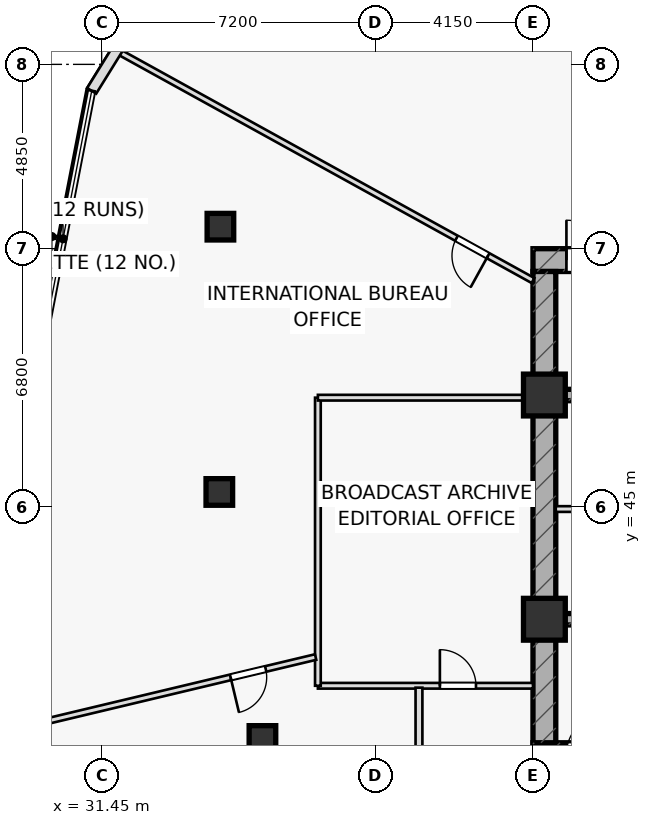
"""IFC4 building model, lengths in metres.
Left out: names, types, materials, properties, quantities, classifications, styles, units other than length and angle.
Written with IfcOpenShell. Run it as: python <this file> out.ifc"""

import sys

from ifc_helpers import new_model, si_unit, direction, frame, frame_2d, origin, origin_2d, place, context, subcontext, project, spatial, rectangle, hollow_rectangle, extrude, element, fill, save


model = new_model("IFC4")
c1 = context("Model", 3, precision=1e-05, world=origin(), true_north=direction((0.0, 1.0)))
c2 = subcontext(c1, "Body", "Model", "MODEL_VIEW")
j1 = project(units=[si_unit("LENGTHUNIT", "METRE"), si_unit("PLANEANGLEUNIT", "RADIAN")], contexts=[c1])
p1 = place(None, origin())
s1 = spatial("IfcSite", under=j1, at=p1, CompositionType="ELEMENT")
p2 = place(p1, origin())
s2 = spatial("IfcBuilding", under=s1, at=p2, CompositionType="ELEMENT")
p3 = place(p2, frame((0.0, 0.0, 127.15)))
s3 = spatial("IfcBuildingStorey", under=s2, at=p3, CompositionType="ELEMENT", Elevation=127.15)
p4 = place(p3, frame((42.8, 51.5, 0.0), z_axis=(0.0, 0.0, 1.0), x_axis=(1.0, 0.0, 0.0)))
e1 = element("IfcWall", 1, at=p4, inside=s3, PredefinedType="SHEAR", context=c2, shape_type="SweptSolid", body=[
    extrude(rectangle(XDim=14.4, YDim=0.6, at=frame_2d((7.2, 0.0))), origin(), (0.0, 0.0, 1.0), 3.55),
])
p5 = place(p4, frame((0.88, 0.0, 0.0)))
e2 = element("IfcOpeningElement", 2, at=p5, cuts=e1, PredefinedType="OPENING", context=c2, shape_type="SweptSolid", body=[
    extrude(rectangle(XDim=1.05, YDim=2.2, at=frame_2d((0.525, 1.1))), frame((0.0, 0.31, 0.0), z_axis=(0.0, -1.0, 0.0), x_axis=(1.0, 0.0, 0.0)), (0.0, 0.0, 1.0), 0.62),
])
p6 = place(p3, frame((42.8, 38.5, 0.0), z_axis=(0.0, 0.0, 1.0), x_axis=(1.0, 0.0, 0.0)))
e3 = element("IfcWall", 3, at=p6, inside=s3, PredefinedType="SHEAR", context=c2, shape_type="SweptSolid", body=[
    extrude(rectangle(XDim=14.4, YDim=0.6, at=frame_2d((7.2, 0.0))), origin(), (0.0, 0.0, 1.0), 3.55),
])
p7 = place(p6, frame((0.88, 0.0, 0.0)))
e4 = element("IfcOpeningElement", 4, at=p7, cuts=e3, PredefinedType="OPENING", context=c2, shape_type="SweptSolid", body=[
    extrude(rectangle(XDim=1.05, YDim=2.2, at=frame_2d((0.525, 1.1))), frame((0.0, 0.31, 0.0), z_axis=(0.0, -1.0, 0.0), x_axis=(1.0, 0.0, 0.0)), (0.0, 0.0, 1.0), 0.62),
])
p8 = place(p3, frame((43.1, 38.8, 0.0), z_axis=(0.0, 0.0, 1.0), x_axis=(0.0, 1.0, 0.0)))
e5 = element("IfcWall", 5, at=p8, inside=s3, PredefinedType="SHEAR", context=c2, shape_type="SweptSolid", body=[
    extrude(rectangle(XDim=12.4, YDim=0.6, at=frame_2d((6.2, 0.0))), origin(), (0.0, 0.0, 1.0), 3.55),
])
p9 = place(p3, frame((43.4, 47.95, 0.0), z_axis=(0.0, 0.0, 1.0), x_axis=(1.0, 0.0, 0.0)))
e6 = element("IfcWall", 6, at=p9, inside=s3, PredefinedType="SHEAR", context=c2, shape_type="SweptSolid", body=[
    extrude(rectangle(XDim=13.2, YDim=0.3, at=frame_2d((6.6, 0.0))), origin(), (0.0, 0.0, 1.0), 3.55),
])
p10 = place(p9, frame((8.345, 0.0, 0.0)))
e7 = element("IfcOpeningElement", 7, at=p10, cuts=e6, PredefinedType="OPENING", context=c2, shape_type="SweptSolid", body=[
    extrude(rectangle(XDim=1.15, YDim=2.2, at=frame_2d((0.575, 1.1))), frame((0.0, 0.16, 0.0), z_axis=(0.0, -1.0, 0.0), x_axis=(1.0, 0.0, 0.0)), (0.0, 0.0, 1.0), 0.32),
])
p11 = place(p9, frame((10.065, 0.0, 0.0)))
e8 = element("IfcOpeningElement", 8, at=p11, cuts=e6, PredefinedType="OPENING", context=c2, shape_type="SweptSolid", body=[
    extrude(rectangle(XDim=1.15, YDim=2.2, at=frame_2d((0.575, 1.1))), frame((0.0, 0.16, 0.0), z_axis=(0.0, -1.0, 0.0), x_axis=(1.0, 0.0, 0.0)), (0.0, 0.0, 1.0), 0.32),
])
p12 = place(p9, frame((11.645, 0.0, 0.0)))
e9 = element("IfcOpeningElement", 9, at=p12, cuts=e6, PredefinedType="OPENING", context=c2, shape_type="SweptSolid", body=[
    extrude(rectangle(XDim=1.15, YDim=2.2, at=frame_2d((0.575, 1.1))), frame((0.0, 0.16, 0.0), z_axis=(0.0, -1.0, 0.0), x_axis=(1.0, 0.0, 0.0)), (0.0, 0.0, 1.0), 0.32),
])
p13 = place(p3, frame((43.4, 42.05, 0.0), z_axis=(0.0, 0.0, 1.0), x_axis=(1.0, 0.0, 0.0)))
e10 = element("IfcWall", 10, at=p13, inside=s3, PredefinedType="SHEAR", context=c2, shape_type="SweptSolid", body=[
    extrude(rectangle(XDim=13.2, YDim=0.3, at=frame_2d((6.6, 0.0))), origin(), (0.0, 0.0, 1.0), 3.55),
])
p14 = place(p13, frame((8.37, 0.0, 0.0)))
e11 = element("IfcOpeningElement", 11, at=p14, cuts=e10, PredefinedType="OPENING", context=c2, shape_type="SweptSolid", body=[
    extrude(rectangle(XDim=1.1, YDim=2.15, at=frame_2d((0.55, 1.075))), frame((0.0, 0.16, 0.0), z_axis=(0.0, -1.0, 0.0), x_axis=(1.0, 0.0, 0.0)), (0.0, 0.0, 1.0), 0.32),
])
p15 = place(p13, frame((10.09, 0.0, 0.0)))
e12 = element("IfcOpeningElement", 12, at=p15, cuts=e10, PredefinedType="OPENING", context=c2, shape_type="SweptSolid", body=[
    extrude(rectangle(XDim=1.1, YDim=2.15, at=frame_2d((0.55, 1.075))), frame((0.0, 0.16, 0.0), z_axis=(0.0, -1.0, 0.0), x_axis=(1.0, 0.0, 0.0)), (0.0, 0.0, 1.0), 0.32),
])
p16 = place(p13, frame((11.83, 0.0, 0.0)))
e13 = element("IfcOpeningElement", 13, at=p16, cuts=e10, PredefinedType="OPENING", context=c2, shape_type="SweptSolid", body=[
    extrude(rectangle(XDim=1.1, YDim=2.15, at=frame_2d((0.55, 1.075))), frame((0.0, 0.16, 0.0), z_axis=(0.0, -1.0, 0.0), x_axis=(1.0, 0.0, 0.0)), (0.0, 0.0, 1.0), 0.32),
])
for number, where, z_axis, x_axis in (
    (14, (43.1, 47.95, 0.0), (0.0, 0.0, 1.0), (1.0, 0.0, 0.0)),
    (15, (43.1, 42.05, 0.0), (0.0, 0.0, 1.0), (1.0, 0.0, 0.0)),
):
    element("IfcColumn", number, at=place(p3, frame(where, z_axis=z_axis, x_axis=x_axis)), inside=s3, PredefinedType="COLUMN", context=c2, shape_type="SweptSolid", body=[
        extrude(rectangle(XDim=1.1, YDim=1.1, at=origin_2d()), origin(), (0.0, 0.0, 1.0), 3.55),
    ])
for number, where, z_axis, x_axis in (
    (16, (34.575, 52.379, 0.0), (0.0, 0.0, 1.0), (1.0, 0.0, 0.0)),
    (17, (34.546, 45.399, 0.0), (0.0, 0.0, 1.0), (1.0, 0.0, 0.0)),
    (18, (35.681, 38.9, 0.0), (0.0, 0.0, 1.0), (1.0, 0.0, 0.0)),
):
    element("IfcColumn", number, at=place(p3, frame(where, z_axis=z_axis, x_axis=x_axis)), inside=s3, PredefinedType="COLUMN", context=c2, shape_type="SweptSolid", body=[
        extrude(hollow_rectangle(XDim=0.7, YDim=0.7, WallThickness=0.04, at=origin_2d()), origin(), (0.0, 0.0, 1.0), 3.55),
    ])
p17 = place(p3, frame((43.4, 44.95, 0.0), z_axis=(0.0, 0.0, 1.0), x_axis=(1.0, 0.0, 0.0)))
e19 = element("IfcWall", 19, at=p17, inside=s3, PredefinedType="PARTITIONING", context=c2, shape_type="SweptSolid", body=[
    extrude(rectangle(XDim=2.35, YDim=0.15, at=frame_2d((1.175, 0.0))), origin(), (0.0, 0.0, 1.0), 3.55),
])
p18 = place(p3, frame((37.14, 40.3, 0.0), z_axis=(0.0, 0.0, 1.0), x_axis=(1.0, 0.0, 0.0)))
e20 = element("IfcWall", 20, at=p18, inside=s3, PredefinedType="PARTITIONING", context=c2, shape_type="SweptSolid", body=[
    extrude(rectangle(XDim=5.66, YDim=0.15, at=frame_2d((2.83, 0.0))), origin(), (0.0, 0.0, 1.0), 3.55),
])
p19 = place(p18, frame((3.21, 0.0, 0.0)))
e21 = element("IfcOpeningElement", 21, at=p19, cuts=e20, PredefinedType="OPENING", context=c2, shape_type="SweptSolid", body=[
    extrude(rectangle(XDim=0.95, YDim=2.05, at=frame_2d((0.475, 1.025))), frame((0.0, 0.085, 0.0), z_axis=(0.0, -1.0, 0.0), x_axis=(1.0, 0.0, 0.0)), (0.0, 0.0, 1.0), 0.17),
])
p20 = place(p3, frame((37.14, 40.3, 0.0), z_axis=(0.0, 0.0, 1.0), x_axis=(0.0, 1.0, 0.0)))
e22 = element("IfcWall", 22, at=p20, inside=s3, PredefinedType="PARTITIONING", context=c2, shape_type="SweptSolid", body=[
    extrude(rectangle(XDim=7.58, YDim=0.15, at=frame_2d((3.79, 0.0))), origin(), (0.0, 0.0, 1.0), 2.835),
])
p21 = place(p3, frame((37.14, 47.88, 0.0), z_axis=(0.0, 0.0, 1.0), x_axis=(1.0, 0.0, 0.0)))
e23 = element("IfcWall", 23, at=p21, inside=s3, PredefinedType="PARTITIONING", context=c2, shape_type="SweptSolid", body=[
    extrude(rectangle(XDim=5.66, YDim=0.15, at=frame_2d((2.83, 0.0))), origin(), (0.0, 0.0, 1.0), 2.835),
])
p22 = place(p3, frame((42.8, 50.963, 0.0), z_axis=(0.0, 0.0, 1.0), x_axis=(-0.875434937419, 0.483335980811, 0.0)))
e24 = element("IfcWall", 24, at=p22, inside=s3, PredefinedType="PARTITIONING", context=c2, shape_type="SweptSolid", body=[
    extrude(rectangle(XDim=12.526, YDim=0.15, at=frame_2d((6.263, 0.0))), origin(), (0.0, 0.0, 1.0), 2.835),
])
p23 = place(p22, frame((1.35, 0.0, 0.0)))
e25 = element("IfcOpeningElement", 25, at=p23, cuts=e24, PredefinedType="OPENING", context=c2, shape_type="SweptSolid", body=[
    extrude(rectangle(XDim=0.95, YDim=2.05, at=frame_2d((0.475, 1.025))), frame((0.0, 0.085, 0.0), z_axis=(0.0, -1.0, 0.0), x_axis=(1.0, 0.0, 0.0)), (0.0, 0.0, 1.0), 0.17),
])
p24 = place(p3, frame((37.08, 41.055, 0.0), z_axis=(0.0, 0.0, 1.0), x_axis=(-0.972658265099, -0.232241037146, 0.0)))
e26 = element("IfcWall", 26, at=p24, inside=s3, PredefinedType="PARTITIONING", context=c2, shape_type="SweptSolid", body=[
    extrude(rectangle(XDim=7.89, YDim=0.15, at=frame_2d((3.945, 0.0))), origin(), (0.0, 0.0, 1.0), 2.975),
])
p25 = place(p24, frame((1.35, 0.0, 0.0)))
e27 = element("IfcOpeningElement", 27, at=p25, cuts=e26, PredefinedType="OPENING", context=c2, shape_type="SweptSolid", body=[
    extrude(rectangle(XDim=0.95, YDim=2.05, at=frame_2d((0.475, 1.025))), frame((0.0, 0.085, 0.0), z_axis=(0.0, -1.0, 0.0), x_axis=(1.0, 0.0, 0.0)), (0.0, 0.0, 1.0), 0.17),
])
p26 = place(p3, frame((39.8, 35.95, 0.0), z_axis=(0.0, 0.0, 1.0), x_axis=(0.0, 1.0, 0.0)))
e28 = element("IfcWall", 28, at=p26, inside=s3, PredefinedType="PARTITIONING", context=c2, shape_type="SweptSolid", body=[
    extrude(rectangle(XDim=4.3, YDim=0.18, at=frame_2d((2.15, 0.0))), origin(), (0.0, 0.0, 1.0), 2.835),
])
p27 = place(p3, frame((35.729, 63.281, 0.0), z_axis=(0.0, 0.0, 1.0), x_axis=(-0.526853741448, -0.849955960696, 0.0)))
e29 = element("IfcWall", 29, at=p27, inside=s3, PredefinedType="STANDARD", context=c2, shape_type="SweptSolid", body=[
    extrude(rectangle(XDim=8.62, YDim=0.28, at=frame_2d((4.31, 0.0))), origin(), (0.0, 0.0, 1.0), 3.55),
])
p28 = place(p5, origin())
e30 = element("IfcDoor", 30, at=p28, inside=s3, OperationType="SINGLE_SWING_LEFT", PredefinedType="DOOR", context=c2, shape_type="SweptSolid", body=[
    extrude(rectangle(XDim=1.05, YDim=2.2, at=frame_2d((0.525, 1.1))), frame((0.0, 0.025, 0.0), z_axis=(0.0, -1.0, 0.0), x_axis=(1.0, 0.0, 0.0)), (0.0, 0.0, 1.0), 0.05),
])
fill(e2, e30)
p29 = place(p19, origin())
e31 = element("IfcDoor", 31, at=p29, inside=s3, OperationType="SINGLE_SWING_LEFT", PredefinedType="DOOR", context=c2, shape_type="SweptSolid", body=[
    extrude(rectangle(XDim=0.95, YDim=2.05, at=frame_2d((0.475, 1.025))), frame((0.0, 0.025, 0.0), z_axis=(0.0, -1.0, 0.0), x_axis=(1.0, 0.0, 0.0)), (0.0, 0.0, 1.0), 0.05),
])
fill(e21, e31)
p30 = place(p23, origin())
e32 = element("IfcDoor", 32, at=p30, inside=s3, OperationType="SINGLE_SWING_LEFT", PredefinedType="DOOR", context=c2, shape_type="SweptSolid", body=[
    extrude(rectangle(XDim=0.95, YDim=2.05, at=frame_2d((0.475, 1.025))), frame((0.0, 0.025, 0.0), z_axis=(0.0, -1.0, 0.0), x_axis=(1.0, 0.0, 0.0)), (0.0, 0.0, 1.0), 0.05),
])
fill(e25, e32)
p31 = place(p25, origin())
e33 = element("IfcDoor", 33, at=p31, inside=s3, OperationType="SINGLE_SWING_RIGHT", PredefinedType="DOOR", context=c2, shape_type="SweptSolid", body=[
    extrude(rectangle(XDim=0.95, YDim=2.05, at=frame_2d((0.475, 1.025))), frame((0.0, 0.025, 0.0), z_axis=(0.0, -1.0, 0.0), x_axis=(1.0, 0.0, 0.0)), (0.0, 0.0, 1.0), 0.05),
])
fill(e27, e33)
save(model, sys.argv[1])
